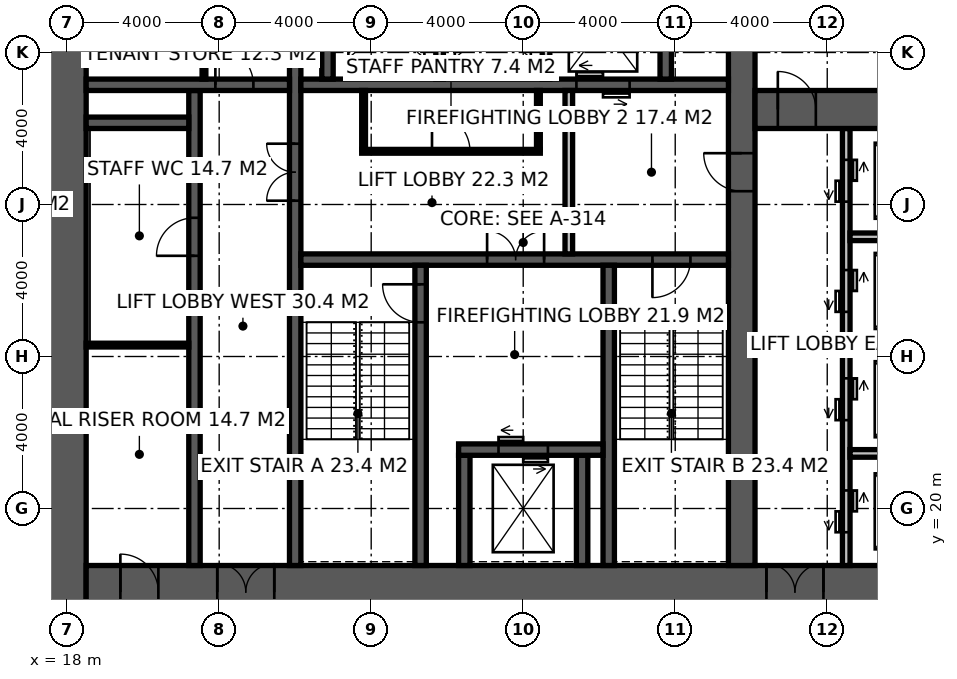
"""IFC4 building model, lengths in metres.
Left out: names, types, materials, properties, quantities, classifications, styles, units other than length and angle.
Written with IfcOpenShell. Run it as: python <this file> out.ifc"""

import sys

from ifc_helpers import new_model, si_unit, direction, frame, frame_2d, origin, place, context, subcontext, project, spatial, rectangle, extrude, element, fill, save


model = new_model("IFC4")
c1 = context("Model", 3, precision=1e-05, world=origin(), true_north=direction((0.0, 1.0)))
c2 = subcontext(c1, "Body", "Model", "MODEL_VIEW")
j1 = project(units=[si_unit("LENGTHUNIT", "METRE"), si_unit("PLANEANGLEUNIT", "RADIAN")], contexts=[c1])
p1 = place(None, origin())
s1 = spatial("IfcSite", under=j1, at=p1, CompositionType="ELEMENT")
p2 = place(p1, origin())
s2 = spatial("IfcBuilding", under=s1, at=p2, CompositionType="ELEMENT")
p3 = place(p2, frame((0.0, 0.0, 43.0)))
s3 = spatial("IfcBuildingStorey", under=s2, at=p3, CompositionType="ELEMENT", Elevation=43.0)
p4 = place(p3, frame((18.0, 17.1, -0.15), z_axis=(0.0, 0.0, 1.0), x_axis=(0.0, 1.0, 0.0)))
e1 = element("IfcWall", 1, at=p4, inside=s3, PredefinedType="SHEAR", context=c2, shape_type="SweptSolid", body=[
    extrude(rectangle(XDim=19.8, YDim=1.0, at=frame_2d((9.9, 0.0))), origin(), (0.0, 0.0, 1.0), 4.0),
])
p5 = place(p3, frame((18.5, 17.8, -0.15), z_axis=(0.0, 0.0, 1.0), x_axis=(1.0, 0.0, 0.0)))
e2 = element("IfcWall", 2, at=p5, inside=s3, PredefinedType="SHEAR", context=c2, shape_type="SweptSolid", body=[
    extrude(rectangle(XDim=23.4, YDim=1.4, at=frame_2d((11.7, 0.0))), origin(), (0.0, 0.0, 1.0), 4.0),
])
p6 = place(p5, frame((3.45, 0.0, 0.15)))
e3 = element("IfcOpeningElement", 3, at=p6, cuts=e2, PredefinedType="OPENING", context=c2, shape_type="SweptSolid", body=[
    extrude(rectangle(XDim=1.5, YDim=2.4, at=frame_2d((0.75, 1.2))), frame((0.0, 0.71, 0.0), z_axis=(0.0, -1.0, 0.0), x_axis=(1.0, 0.0, 0.0)), (0.0, 0.0, 1.0), 1.42),
])
p7 = place(p5, frame((17.9, 0.0, 0.15)))
e4 = element("IfcOpeningElement", 4, at=p7, cuts=e2, PredefinedType="OPENING", context=c2, shape_type="SweptSolid", body=[
    extrude(rectangle(XDim=1.5, YDim=2.4, at=frame_2d((0.75, 1.2))), frame((0.0, 0.71, 0.0), z_axis=(0.0, -1.0, 0.0), x_axis=(1.0, 0.0, 0.0)), (0.0, 0.0, 1.0), 1.42),
])
p8 = place(p5, frame((0.9, 0.0, 0.15)))
e5 = element("IfcOpeningElement", 5, at=p8, cuts=e2, PredefinedType="OPENING", context=c2, shape_type="SweptSolid", body=[
    extrude(rectangle(XDim=1.0, YDim=2.2, at=frame_2d((0.5, 1.1))), frame((0.0, 0.71, 0.0), z_axis=(0.0, -1.0, 0.0), x_axis=(1.0, 0.0, 0.0)), (0.0, 0.0, 1.0), 1.42),
])
p9 = place(p3, frame((35.75, 18.5, -0.15), z_axis=(0.0, 0.0, 1.0), x_axis=(0.0, 1.0, 0.0)))
e6 = element("IfcWall", 6, at=p9, inside=s3, PredefinedType="SHEAR", context=c2, shape_type="SweptSolid", body=[
    extrude(rectangle(XDim=17.0, YDim=0.7, at=frame_2d((8.5, 0.0))), origin(), (0.0, 0.0, 1.0), 4.0),
])
p10 = place(p9, frame((9.85, 0.0, 0.15)))
e7 = element("IfcOpeningElement", 7, at=p10, cuts=e6, PredefinedType="OPENING", context=c2, shape_type="SweptSolid", body=[
    extrude(rectangle(XDim=1.0, YDim=2.2, at=frame_2d((0.5, 1.1))), frame((0.0, 0.36, 0.0), z_axis=(0.0, -1.0, 0.0), x_axis=(1.0, 0.0, 0.0)), (0.0, 0.0, 1.0), 0.72),
])
p11 = place(p3, frame((24.0, 18.5, -0.15), z_axis=(0.0, 0.0, 1.0), x_axis=(0.0, 1.0, 0.0)))
e8 = element("IfcWall", 8, at=p11, inside=s3, PredefinedType="SHEAR", context=c2, shape_type="SweptSolid", body=[
    extrude(rectangle(XDim=17.0, YDim=0.3, at=frame_2d((8.5, 0.0))), origin(), (0.0, 0.0, 1.0), 4.0),
])
p12 = place(p11, frame((9.6, 0.0, 0.15)))
e9 = element("IfcOpeningElement", 9, at=p12, cuts=e8, PredefinedType="OPENING", context=c2, shape_type="SweptSolid", body=[
    extrude(rectangle(XDim=1.5, YDim=2.4, at=frame_2d((0.75, 1.2))), frame((0.0, 0.16, 0.0), z_axis=(0.0, -1.0, 0.0), x_axis=(1.0, 0.0, 0.0)), (0.0, 0.0, 1.0), 0.32),
])
p13 = place(p3, frame((24.15, 26.55, -0.15), z_axis=(0.0, 0.0, 1.0), x_axis=(1.0, 0.0, 0.0)))
e10 = element("IfcWall", 10, at=p13, inside=s3, PredefinedType="SHEAR", context=c2, shape_type="SweptSolid", body=[
    extrude(rectangle(XDim=11.25, YDim=0.3, at=frame_2d((5.625, 0.0))), origin(), (0.0, 0.0, 1.0), 4.0),
])
p14 = place(p13, frame((9.25, 0.0, 0.15)))
e11 = element("IfcOpeningElement", 11, at=p14, cuts=e10, PredefinedType="OPENING", context=c2, shape_type="SweptSolid", body=[
    extrude(rectangle(XDim=1.0, YDim=2.2, at=frame_2d((0.5, 1.1))), frame((0.0, 0.16, 0.0), z_axis=(0.0, -1.0, 0.0), x_axis=(1.0, 0.0, 0.0)), (0.0, 0.0, 1.0), 0.32),
])
p15 = place(p13, frame((4.9, 0.0, 0.15)))
e12 = element("IfcOpeningElement", 12, at=p15, cuts=e10, PredefinedType="OPENING", context=c2, shape_type="SweptSolid", body=[
    extrude(rectangle(XDim=1.5, YDim=2.4, at=frame_2d((0.75, 1.2))), frame((0.0, 0.16, 0.0), z_axis=(0.0, -1.0, 0.0), x_axis=(1.0, 0.0, 0.0)), (0.0, 0.0, 1.0), 0.32),
])
p16 = place(p3, frame((27.3, 18.5, -0.15), z_axis=(0.0, 0.0, 1.0), x_axis=(0.0, 1.0, 0.0)))
e13 = element("IfcWall", 13, at=p16, inside=s3, PredefinedType="SHEAR", context=c2, shape_type="SweptSolid", body=[
    extrude(rectangle(XDim=7.9, YDim=0.3, at=frame_2d((3.95, 0.0))), origin(), (0.0, 0.0, 1.0), 4.0),
])
p17 = place(p16, frame((6.4, 0.0, 0.15)))
e14 = element("IfcOpeningElement", 14, at=p17, cuts=e13, PredefinedType="OPENING", context=c2, shape_type="SweptSolid", body=[
    extrude(rectangle(XDim=1.0, YDim=2.2, at=frame_2d((0.5, 1.1))), frame((0.0, 0.16, 0.0), z_axis=(0.0, -1.0, 0.0), x_axis=(1.0, 0.0, 0.0)), (0.0, 0.0, 1.0), 0.32),
])
p18 = place(p3, frame((32.25, 18.5, -0.15), z_axis=(0.0, 0.0, 1.0), x_axis=(0.0, 1.0, 0.0)))
e15 = element("IfcWall", 15, at=p18, inside=s3, PredefinedType="SHEAR", context=c2, shape_type="SweptSolid", body=[
    extrude(rectangle(XDim=7.9, YDim=0.3, at=frame_2d((3.95, 0.0))), origin(), (0.0, 0.0, 1.0), 4.0),
])
for number, where, z_axis, x_axis in (
    (16, (28.45, 18.5, -0.15), (0.0, 0.0, 1.0), (0.0, 1.0, 0.0)),
    (17, (31.55, 18.5, -0.15), (0.0, 0.0, 1.0), (0.0, 1.0, 0.0)),
):
    element("IfcWall", number, at=place(p3, frame(where, z_axis=z_axis, x_axis=x_axis)), inside=s3, PredefinedType="SHEAR", context=c2, shape_type="SweptSolid", body=[
        extrude(rectangle(XDim=2.9, YDim=0.3, at=frame_2d((1.45, 0.0))), origin(), (0.0, 0.0, 1.0), 4.0),
    ])
p19 = place(p3, frame((28.3, 21.55, -0.15), z_axis=(0.0, 0.0, 1.0), x_axis=(1.0, 0.0, 0.0)))
e18 = element("IfcWall", 18, at=p19, inside=s3, PredefinedType="SHEAR", context=c2, shape_type="SweptSolid", body=[
    extrude(rectangle(XDim=3.8, YDim=0.3, at=frame_2d((1.9, 0.0))), origin(), (0.0, 0.0, 1.0), 4.0),
])
p20 = place(p19, frame((1.05, 0.0, 0.15)))
e19 = element("IfcOpeningElement", 19, at=p20, cuts=e18, PredefinedType="OPENING", context=c2, shape_type="SweptSolid", body=[
    extrude(rectangle(XDim=1.3, YDim=2.4, at=frame_2d((0.65, 1.2))), frame((0.0, 0.16, 0.0), z_axis=(0.0, -1.0, 0.0), x_axis=(1.0, 0.0, 0.0)), (0.0, 0.0, 1.0), 0.32),
])
p21 = place(p3, frame((24.15, 31.15, -0.15), z_axis=(0.0, 0.0, 1.0), x_axis=(1.0, 0.0, 0.0)))
e20 = element("IfcWall", 20, at=p21, inside=s3, PredefinedType="SHEAR", context=c2, shape_type="SweptSolid", body=[
    extrude(rectangle(XDim=11.25, YDim=0.3, at=frame_2d((5.625, 0.0))), origin(), (0.0, 0.0, 1.0), 4.0),
])
p22 = place(p21, frame((7.25, 0.0, 0.15)))
e21 = element("IfcOpeningElement", 21, at=p22, cuts=e20, PredefinedType="OPENING", context=c2, shape_type="SweptSolid", body=[
    extrude(rectangle(XDim=1.4, YDim=2.4, at=frame_2d((0.7, 1.2))), frame((0.0, 0.16, 0.0), z_axis=(0.0, -1.0, 0.0), x_axis=(1.0, 0.0, 0.0)), (0.0, 0.0, 1.0), 0.32),
])
p23 = place(p3, frame((21.35, 18.5, -0.15), z_axis=(0.0, 0.0, 1.0), x_axis=(0.0, 1.0, 0.0)))
e22 = element("IfcWall", 22, at=p23, inside=s3, PredefinedType="SHEAR", context=c2, shape_type="SweptSolid", body=[
    extrude(rectangle(XDim=12.5, YDim=0.3, at=frame_2d((6.25, 0.0))), origin(), (0.0, 0.0, 1.0), 4.0),
])
p24 = place(p23, frame((8.15, 0.0, 0.15)))
e23 = element("IfcOpeningElement", 23, at=p24, cuts=e22, PredefinedType="OPENING", context=c2, shape_type="SweptSolid", body=[
    extrude(rectangle(XDim=1.0, YDim=2.2, at=frame_2d((0.5, 1.1))), frame((0.0, 0.16, 0.0), z_axis=(0.0, -1.0, 0.0), x_axis=(1.0, 0.0, 0.0)), (0.0, 0.0, 1.0), 0.32),
])
p25 = place(p3, frame((18.5, 31.15, -0.15), z_axis=(0.0, 0.0, 1.0), x_axis=(1.0, 0.0, 0.0)))
e24 = element("IfcWall", 24, at=p25, inside=s3, PredefinedType="SHEAR", context=c2, shape_type="SweptSolid", body=[
    extrude(rectangle(XDim=5.35, YDim=0.3, at=frame_2d((2.675, 0.0))), origin(), (0.0, 0.0, 1.0), 4.0),
])
p26 = place(p25, frame((3.4, 0.0, 0.15)))
e25 = element("IfcOpeningElement", 25, at=p26, cuts=e24, PredefinedType="OPENING", context=c2, shape_type="SweptSolid", body=[
    extrude(rectangle(XDim=1.0, YDim=2.2, at=frame_2d((0.5, 1.1))), frame((0.0, 0.16, 0.0), z_axis=(0.0, -1.0, 0.0), x_axis=(1.0, 0.0, 0.0)), (0.0, 0.0, 1.0), 0.32),
])
p27 = place(p3, frame((18.5, 30.15, -0.15), z_axis=(0.0, 0.0, 1.0), x_axis=(1.0, 0.0, 0.0)))
e26 = element("IfcWall", 26, at=p27, inside=s3, PredefinedType="SHEAR", context=c2, shape_type="SweptSolid", body=[
    extrude(rectangle(XDim=2.7, YDim=0.3, at=frame_2d((1.35, 0.0))), origin(), (0.0, 0.0, 1.0), 4.0),
])
for number, where, z_axis, x_axis in (
    (27, (24.85, 31.3, -0.15), (0.0, 0.0, 1.0), (0.0, 1.0, 0.0)),
    (28, (33.75, 31.3, -0.15), (0.0, 0.0, 1.0), (0.0, 1.0, 0.0)),
):
    element("IfcWall", number, at=place(p3, frame(where, z_axis=z_axis, x_axis=x_axis)), inside=s3, PredefinedType="SHEAR", context=c2, shape_type="SweptSolid", body=[
        extrude(rectangle(XDim=4.2, YDim=0.3, at=frame_2d((2.1, 0.0))), origin(), (0.0, 0.0, 1.0), 4.0),
    ])
for number, where, z_axis, x_axis in (
    (29, (27.8, 31.3, -0.15), (0.0, 0.0, 1.0), (0.0, 1.0, 0.0)),
    (30, (30.6, 31.3, -0.15), (0.0, 0.0, 1.0), (0.0, 1.0, 0.0)),
):
    element("IfcWall", number, at=place(p3, frame(where, z_axis=z_axis, x_axis=x_axis)), inside=s3, PredefinedType="SOLIDWALL", context=c2, shape_type="SweptSolid", body=[
        extrude(rectangle(XDim=2.8, YDim=0.2, at=frame_2d((1.4, 0.0))), origin(), (0.0, 0.0, 1.0), 4.0),
    ])
p28 = place(p3, frame((38.5, 18.5, -0.15), z_axis=(0.0, 0.0, 1.0), x_axis=(0.0, 1.0, 0.0)))
e31 = element("IfcWall", 31, at=p28, inside=s3, PredefinedType="SOLIDWALL", context=c2, shape_type="SweptSolid", body=[
    extrude(rectangle(XDim=11.5, YDim=0.2, at=frame_2d((5.75, 0.0))), origin(), (0.0, 0.0, 1.0), 4.0),
])
p29 = place(p28, frame((0.875, 0.0, 0.15)))
e32 = element("IfcOpeningElement", 32, at=p29, cuts=e31, PredefinedType="OPENING", context=c2, shape_type="SweptSolid", body=[
    extrude(rectangle(XDim=1.1, YDim=2.2, at=frame_2d((0.55, 1.1))), frame((0.0, 0.11, 0.0), z_axis=(0.0, -1.0, 0.0), x_axis=(1.0, 0.0, 0.0)), (0.0, 0.0, 1.0), 0.22),
])
p30 = place(p28, frame((3.825, 0.0, 0.15)))
e33 = element("IfcOpeningElement", 33, at=p30, cuts=e31, PredefinedType="OPENING", context=c2, shape_type="SweptSolid", body=[
    extrude(rectangle(XDim=1.1, YDim=2.2, at=frame_2d((0.55, 1.1))), frame((0.0, 0.11, 0.0), z_axis=(0.0, -1.0, 0.0), x_axis=(1.0, 0.0, 0.0)), (0.0, 0.0, 1.0), 0.22),
])
p31 = place(p28, frame((6.675, 0.0, 0.15)))
e34 = element("IfcOpeningElement", 34, at=p31, cuts=e31, PredefinedType="OPENING", context=c2, shape_type="SweptSolid", body=[
    extrude(rectangle(XDim=1.1, YDim=2.2, at=frame_2d((0.55, 1.1))), frame((0.0, 0.11, 0.0), z_axis=(0.0, -1.0, 0.0), x_axis=(1.0, 0.0, 0.0)), (0.0, 0.0, 1.0), 0.22),
])
p32 = place(p28, frame((9.575, 0.0, 0.15)))
e35 = element("IfcOpeningElement", 35, at=p32, cuts=e31, PredefinedType="OPENING", context=c2, shape_type="SweptSolid", body=[
    extrude(rectangle(XDim=1.1, YDim=2.2, at=frame_2d((0.55, 1.1))), frame((0.0, 0.11, 0.0), z_axis=(0.0, -1.0, 0.0), x_axis=(1.0, 0.0, 0.0)), (0.0, 0.0, 1.0), 0.22),
])
p33 = place(p3, frame((36.1, 30.5, -0.15), z_axis=(0.0, 0.0, 1.0), x_axis=(1.0, 0.0, 0.0)))
e36 = element("IfcWall", 36, at=p33, inside=s3, PredefinedType="SHEAR", context=c2, shape_type="SweptSolid", body=[
    extrude(rectangle(XDim=5.8, YDim=1.0, at=frame_2d((2.9, 0.0))), origin(), (0.0, 0.0, 1.0), 4.0),
])
p34 = place(p33, frame((0.6, 0.0, 0.15)))
e37 = element("IfcOpeningElement", 37, at=p34, cuts=e36, PredefinedType="OPENING", context=c2, shape_type="SweptSolid", body=[
    extrude(rectangle(XDim=1.0, YDim=2.2, at=frame_2d((0.5, 1.1))), frame((0.0, 0.51, 0.0), z_axis=(0.0, -1.0, 0.0), x_axis=(1.0, 0.0, 0.0)), (0.0, 0.0, 1.0), 1.02),
])
for number, where, z_axis, x_axis in (
    (38, (38.6, 21.45, -0.15), (0.0, 0.0, 1.0), (1.0, 0.0, 0.0)),
    (39, (38.6, 24.3, -0.15), (0.0, 0.0, 1.0), (1.0, 0.0, 0.0)),
    (40, (38.6, 27.15, -0.15), (0.0, 0.0, 1.0), (1.0, 0.0, 0.0)),
):
    element("IfcWall", number, at=place(p3, frame(where, z_axis=z_axis, x_axis=x_axis)), inside=s3, PredefinedType="SOLIDWALL", context=c2, shape_type="SweptSolid", body=[
        extrude(rectangle(XDim=2.9, YDim=0.2, at=frame_2d((1.45, 0.0))), origin(), (0.0, 0.0, 1.0), 4.0),
    ])
p35 = place(p3, frame((31.2, 26.7, 0.0), z_axis=(0.0, 0.0, 1.0), x_axis=(0.0, 1.0, 0.0)))
e41 = element("IfcWall", 41, at=p35, inside=s3, PredefinedType="SOLIDWALL", context=c2, shape_type="SweptSolid", body=[
    extrude(rectangle(XDim=4.3, YDim=0.2, at=frame_2d((2.15, 0.0))), origin(), (0.0, 0.0, 1.0), 3.85),
])
p36 = place(p3, frame((21.6, 31.3, 0.0), z_axis=(0.0, 0.0, 1.0), x_axis=(0.0, 1.0, 0.0)))
e42 = element("IfcWall", 42, at=p36, inside=s3, PredefinedType="PARTITIONING", context=c2, shape_type="SweptSolid", body=[
    extrude(rectangle(XDim=4.2, YDim=0.1, at=frame_2d((2.1, 0.0))), origin(), (0.0, 0.0, 1.0), 3.85),
])
p37 = place(p36, frame((1.55, 0.0, 0.0)))
e43 = element("IfcOpeningElement", 43, at=p37, cuts=e42, PredefinedType="OPENING", context=c2, shape_type="SweptSolid", body=[
    extrude(rectangle(XDim=1.0, YDim=2.2, at=frame_2d((0.5, 1.1))), frame((0.0, 0.06, 0.0), z_axis=(0.0, -1.0, 0.0), x_axis=(1.0, 0.0, 0.0)), (0.0, 0.0, 1.0), 0.12),
])
p38 = place(p3, frame((25.75, 29.4, 0.0), z_axis=(0.0, 0.0, 1.0), x_axis=(1.0, 0.0, 0.0)))
e44 = element("IfcWall", 44, at=p38, inside=s3, PredefinedType="PARTITIONING", context=c2, shape_type="SweptSolid", body=[
    extrude(rectangle(XDim=4.7, YDim=0.1, at=frame_2d((2.35, 0.0))), origin(), (0.0, 0.0, 1.0), 3.85),
])
p39 = place(p38, frame((1.85, 0.0, 0.0)))
e45 = element("IfcOpeningElement", 45, at=p39, cuts=e44, PredefinedType="OPENING", context=c2, shape_type="SweptSolid", body=[
    extrude(rectangle(XDim=1.0, YDim=2.2, at=frame_2d((0.5, 1.1))), frame((0.0, 0.06, 0.0), z_axis=(0.0, -1.0, 0.0), x_axis=(1.0, 0.0, 0.0)), (0.0, 0.0, 1.0), 0.12),
])
for number, where, z_axis, x_axis in (
    (46, (25.8, 29.45, 0.0), (0.0, 0.0, 1.0), (0.0, 1.0, 0.0)),
    (47, (30.4, 29.45, 0.0), (0.0, 0.0, 1.0), (0.0, 1.0, 0.0)),
):
    element("IfcWall", number, at=place(p3, frame(where, z_axis=z_axis, x_axis=x_axis)), inside=s3, PredefinedType="PARTITIONING", context=c2, shape_type="SweptSolid", body=[
        extrude(rectangle(XDim=1.55, YDim=0.1, at=frame_2d((0.775, 0.0))), origin(), (0.0, 0.0, 1.0), 3.85),
    ])
p40 = place(p3, frame((18.5, 24.3, 0.0), z_axis=(0.0, 0.0, 1.0), x_axis=(1.0, 0.0, 0.0)))
e48 = element("IfcWall", 48, at=p40, inside=s3, PredefinedType="PARTITIONING", context=c2, shape_type="SweptSolid", body=[
    extrude(rectangle(XDim=2.7, YDim=0.1, at=frame_2d((1.35, 0.0))), origin(), (0.0, 0.0, 1.0), 3.85),
])
p41 = place(p17, origin())
e49 = element("IfcDoor", 49, at=p41, inside=s3, OperationType="SINGLE_SWING_RIGHT", PredefinedType="DOOR", context=c2, shape_type="SweptSolid", body=[
    extrude(rectangle(XDim=1.0, YDim=2.2, at=frame_2d((0.5, 1.1))), frame((0.0, 0.025, 0.0), z_axis=(0.0, -1.0, 0.0), x_axis=(1.0, 0.0, 0.0)), (0.0, 0.0, 1.0), 0.05),
])
fill(e14, e49)
p42 = place(p14, frame((1.0, 0.0, 0.0), z_axis=(0.0, 0.0, 1.0), x_axis=(-1.0, 0.0, 0.0)))
e50 = element("IfcDoor", 50, at=p42, inside=s3, OperationType="SINGLE_SWING_RIGHT", PredefinedType="DOOR", context=c2, shape_type="SweptSolid", body=[
    extrude(rectangle(XDim=1.0, YDim=2.2, at=frame_2d((0.5, 1.1))), frame((0.0, 0.025, 0.0), z_axis=(0.0, -1.0, 0.0), x_axis=(1.0, 0.0, 0.0)), (0.0, 0.0, 1.0), 0.05),
])
fill(e11, e50)
p43 = place(p10, origin())
e51 = element("IfcDoor", 51, at=p43, inside=s3, OperationType="SINGLE_SWING_RIGHT", PredefinedType="DOOR", context=c2, shape_type="SweptSolid", body=[
    extrude(rectangle(XDim=1.0, YDim=2.2, at=frame_2d((0.5, 1.1))), frame((0.0, 0.025, 0.0), z_axis=(0.0, -1.0, 0.0), x_axis=(1.0, 0.0, 0.0)), (0.0, 0.0, 1.0), 0.05),
])
fill(e7, e51)
p44 = place(p15, origin())
e52 = element("IfcDoor", 52, at=p44, inside=s3, OperationType="DOUBLE_DOOR_DOUBLE_SWING", PredefinedType="DOOR", context=c2, shape_type="SweptSolid", body=[
    extrude(rectangle(XDim=1.5, YDim=2.4, at=frame_2d((0.75, 1.2))), frame((0.0, 0.025, 0.0), z_axis=(0.0, -1.0, 0.0), x_axis=(1.0, 0.0, 0.0)), (0.0, 0.0, 1.0), 0.05),
])
fill(e12, e52)
p45 = place(p12, origin())
e53 = element("IfcDoor", 53, at=p45, inside=s3, OperationType="DOUBLE_DOOR_DOUBLE_SWING", PredefinedType="DOOR", context=c2, shape_type="SweptSolid", body=[
    extrude(rectangle(XDim=1.5, YDim=2.4, at=frame_2d((0.75, 1.2))), frame((0.0, 0.025, 0.0), z_axis=(0.0, -1.0, 0.0), x_axis=(1.0, 0.0, 0.0)), (0.0, 0.0, 1.0), 0.05),
])
fill(e9, e53)
p46 = place(p26, origin())
e54 = element("IfcDoor", 54, at=p46, inside=s3, OperationType="SINGLE_SWING_LEFT", PredefinedType="DOOR", context=c2, shape_type="SweptSolid", body=[
    extrude(rectangle(XDim=1.0, YDim=2.2, at=frame_2d((0.5, 1.1))), frame((0.0, 0.025, 0.0), z_axis=(0.0, -1.0, 0.0), x_axis=(1.0, 0.0, 0.0)), (0.0, 0.0, 1.0), 0.05),
])
fill(e25, e54)
p47 = place(p39, origin())
e55 = element("IfcDoor", 55, at=p47, inside=s3, OperationType="SINGLE_SWING_LEFT", PredefinedType="DOOR", context=c2, shape_type="SweptSolid", body=[
    extrude(rectangle(XDim=1.0, YDim=2.2, at=frame_2d((0.5, 1.1))), frame((0.0, 0.025, 0.0), z_axis=(0.0, -1.0, 0.0), x_axis=(1.0, 0.0, 0.0)), (0.0, 0.0, 1.0), 0.05),
])
fill(e45, e55)
p48 = place(p24, origin())
e56 = element("IfcDoor", 56, at=p48, inside=s3, OperationType="SINGLE_SWING_LEFT", PredefinedType="DOOR", context=c2, shape_type="SweptSolid", body=[
    extrude(rectangle(XDim=1.0, YDim=2.2, at=frame_2d((0.5, 1.1))), frame((0.0, 0.025, 0.0), z_axis=(0.0, -1.0, 0.0), x_axis=(1.0, 0.0, 0.0)), (0.0, 0.0, 1.0), 0.05),
])
fill(e23, e56)
p49 = place(p6, origin())
e57 = element("IfcDoor", 57, at=p49, inside=s3, OperationType="DOUBLE_DOOR_DOUBLE_SWING", PredefinedType="DOOR", context=c2, shape_type="SweptSolid", body=[
    extrude(rectangle(XDim=1.5, YDim=2.4, at=frame_2d((0.75, 1.2))), frame((0.0, 0.025, 0.0), z_axis=(0.0, -1.0, 0.0), x_axis=(1.0, 0.0, 0.0)), (0.0, 0.0, 1.0), 0.05),
])
fill(e3, e57)
p50 = place(p7, origin())
e58 = element("IfcDoor", 58, at=p50, inside=s3, OperationType="DOUBLE_DOOR_DOUBLE_SWING", PredefinedType="DOOR", context=c2, shape_type="SweptSolid", body=[
    extrude(rectangle(XDim=1.5, YDim=2.4, at=frame_2d((0.75, 1.2))), frame((0.0, 0.025, 0.0), z_axis=(0.0, -1.0, 0.0), x_axis=(1.0, 0.0, 0.0)), (0.0, 0.0, 1.0), 0.05),
])
fill(e4, e58)
p51 = place(p34, origin())
e59 = element("IfcDoor", 59, at=p51, inside=s3, OperationType="SINGLE_SWING_LEFT", PredefinedType="DOOR", context=c2, shape_type="SweptSolid", body=[
    extrude(rectangle(XDim=1.0, YDim=2.2, at=frame_2d((0.5, 1.1))), frame((0.0, 0.025, 0.0), z_axis=(0.0, -1.0, 0.0), x_axis=(1.0, 0.0, 0.0)), (0.0, 0.0, 1.0), 0.05),
])
fill(e37, e59)
p52 = place(p8, origin())
e60 = element("IfcDoor", 60, at=p52, inside=s3, OperationType="SINGLE_SWING_LEFT", PredefinedType="DOOR", context=c2, shape_type="SweptSolid", body=[
    extrude(rectangle(XDim=1.0, YDim=2.2, at=frame_2d((0.5, 1.1))), frame((0.0, 0.025, 0.0), z_axis=(0.0, -1.0, 0.0), x_axis=(1.0, 0.0, 0.0)), (0.0, 0.0, 1.0), 0.05),
])
fill(e5, e60)
p53 = place(p20, origin())
e61 = element("IfcDoor", 61, at=p53, inside=s3, OperationType="DOUBLE_DOOR_SLIDING", PredefinedType="DOOR", context=c2, shape_type="SweptSolid", body=[
    extrude(rectangle(XDim=1.3, YDim=2.4, at=frame_2d((0.65, 1.2))), frame((0.0, 0.025, 0.0), z_axis=(0.0, -1.0, 0.0), x_axis=(1.0, 0.0, 0.0)), (0.0, 0.0, 1.0), 0.05),
])
fill(e19, e61)
p54 = place(p22, origin())
e62 = element("IfcDoor", 62, at=p54, inside=s3, OperationType="DOUBLE_DOOR_SLIDING", PredefinedType="DOOR", context=c2, shape_type="SweptSolid", body=[
    extrude(rectangle(XDim=1.4, YDim=2.4, at=frame_2d((0.7, 1.2))), frame((0.0, 0.025, 0.0), z_axis=(0.0, -1.0, 0.0), x_axis=(1.0, 0.0, 0.0)), (0.0, 0.0, 1.0), 0.05),
])
fill(e21, e62)
p55 = place(p29, origin())
e63 = element("IfcDoor", 63, at=p55, inside=s3, OperationType="DOUBLE_DOOR_SLIDING", PredefinedType="DOOR", context=c2, shape_type="SweptSolid", body=[
    extrude(rectangle(XDim=1.1, YDim=2.2, at=frame_2d((0.55, 1.1))), frame((0.0, 0.025, 0.0), z_axis=(0.0, -1.0, 0.0), x_axis=(1.0, 0.0, 0.0)), (0.0, 0.0, 1.0), 0.05),
])
fill(e32, e63)
p56 = place(p30, origin())
e64 = element("IfcDoor", 64, at=p56, inside=s3, OperationType="DOUBLE_DOOR_SLIDING", PredefinedType="DOOR", context=c2, shape_type="SweptSolid", body=[
    extrude(rectangle(XDim=1.1, YDim=2.2, at=frame_2d((0.55, 1.1))), frame((0.0, 0.025, 0.0), z_axis=(0.0, -1.0, 0.0), x_axis=(1.0, 0.0, 0.0)), (0.0, 0.0, 1.0), 0.05),
])
fill(e33, e64)
p57 = place(p31, origin())
e65 = element("IfcDoor", 65, at=p57, inside=s3, OperationType="DOUBLE_DOOR_SLIDING", PredefinedType="DOOR", context=c2, shape_type="SweptSolid", body=[
    extrude(rectangle(XDim=1.1, YDim=2.2, at=frame_2d((0.55, 1.1))), frame((0.0, 0.025, 0.0), z_axis=(0.0, -1.0, 0.0), x_axis=(1.0, 0.0, 0.0)), (0.0, 0.0, 1.0), 0.05),
])
fill(e34, e65)
p58 = place(p32, origin())
e66 = element("IfcDoor", 66, at=p58, inside=s3, OperationType="DOUBLE_DOOR_SLIDING", PredefinedType="DOOR", context=c2, shape_type="SweptSolid", body=[
    extrude(rectangle(XDim=1.1, YDim=2.2, at=frame_2d((0.55, 1.1))), frame((0.0, 0.025, 0.0), z_axis=(0.0, -1.0, 0.0), x_axis=(1.0, 0.0, 0.0)), (0.0, 0.0, 1.0), 0.05),
])
fill(e35, e66)
save(model, sys.argv[1])
